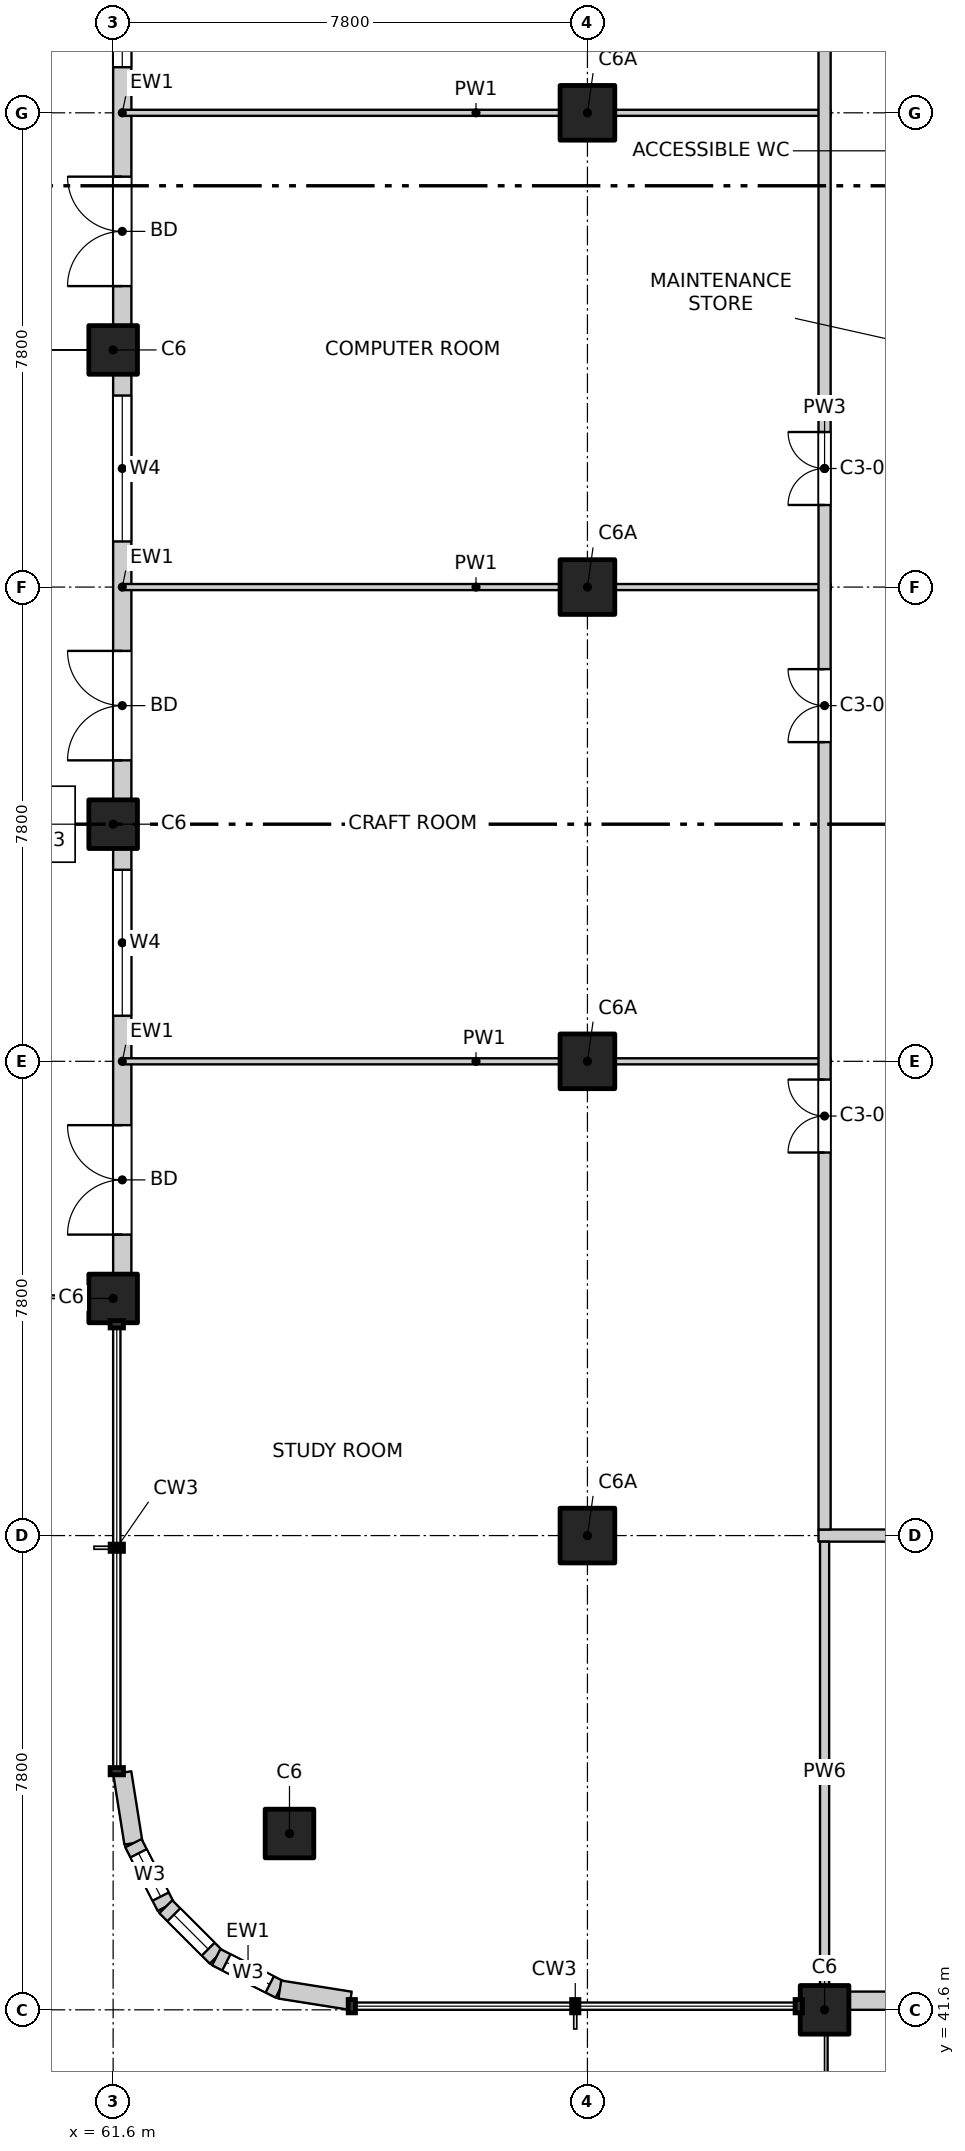
"""IFC4 building model, lengths in metres.
Left out: names, types, materials, properties, quantities, classifications, styles, units other than length and angle.
Written with IfcOpenShell. Run it as: python <this file> out.ifc"""

import sys

from ifc_helpers import new_model, si_unit, direction, frame, frame_2d, origin, origin_2d, place, context, subcontext, project, spatial, rectangle, extrude, element, fill, save


model = new_model("IFC4")
c1 = context("Model", 3, precision=1e-05, world=origin(), true_north=direction((0.0, 1.0)))
c2 = subcontext(c1, "Body", "Model", "MODEL_VIEW")
j1 = project(units=[si_unit("LENGTHUNIT", "METRE"), si_unit("PLANEANGLEUNIT", "RADIAN")], contexts=[c1])
p1 = place(None, origin())
s1 = spatial("IfcSite", under=j1, at=p1, CompositionType="ELEMENT")
p2 = place(p1, origin())
s2 = spatial("IfcBuilding", under=s1, at=p2, CompositionType="ELEMENT")
p3 = place(p2, frame((0.0, 0.0, 200.7)))
s3 = spatial("IfcBuildingStorey", under=s2, at=p3, CompositionType="ELEMENT", Elevation=200.7)
for number, where, z_axis, x_axis in (
    (1, (64.5, 44.5, -0.25), (0.0, 0.0, 1.0), (1.0, 0.0, 0.0)),
    (2, (61.6, 53.3, -0.25), (0.0, 0.0, 1.0), (1.0, 0.0, 0.0)),
    (3, (73.3, 41.6, -0.25), (0.0, 0.0, 1.0), (1.0, 0.0, 0.0)),
    (4, (61.6, 61.1, -0.25), (0.0, 0.0, 1.0), (1.0, 0.0, 0.0)),
    (5, (61.6, 68.9, -0.25), (0.0, 0.0, 1.0), (1.0, 0.0, 0.0)),
):
    element("IfcColumn", number, at=place(p3, frame(where, z_axis=z_axis, x_axis=x_axis)), inside=s3, PredefinedType="COLUMN", context=c2, shape_type="SweptSolid", body=[
        extrude(rectangle(XDim=0.8, YDim=0.8, at=origin_2d()), origin(), (0.0, 0.0, 1.0), 3.4),
    ])
for number, where, z_axis, x_axis in (
    (6, (69.4, 49.4, -0.25), (0.0, 0.0, 1.0), (1.0, 0.0, 0.0)),
    (7, (69.4, 57.2, -0.25), (0.0, 0.0, 1.0), (1.0, 0.0, 0.0)),
    (8, (69.4, 65.0, -0.25), (0.0, 0.0, 1.0), (1.0, 0.0, 0.0)),
    (9, (69.4, 72.8, -0.25), (0.0, 0.0, 1.0), (1.0, 0.0, 0.0)),
):
    element("IfcColumn", number, at=place(p3, frame(where, z_axis=z_axis, x_axis=x_axis)), inside=s3, PredefinedType="COLUMN", context=c2, shape_type="SweptSolid", body=[
        extrude(rectangle(XDim=0.9, YDim=0.9, at=origin_2d()), origin(), (0.0, 0.0, 1.0), 3.4),
    ])
p4 = place(p3, frame((73.7, 41.75, 0.0), z_axis=(0.0, 0.0, 1.0), x_axis=(1.0, 0.0, 0.0)))
e10 = element("IfcWall", 10, at=p4, inside=s3, PredefinedType="SOLIDWALL", context=c2, shape_type="SweptSolid", body=[
    extrude(rectangle(XDim=7.0, YDim=0.3, at=frame_2d((3.5, 0.0))), origin(), (0.0, 0.0, 1.0), 2.7),
])
p5 = place(p4, frame((0.65, 0.0, 0.0)))
e11 = element("IfcOpeningElement", 11, at=p5, cuts=e10, PredefinedType="OPENING", context=c2, shape_type="SweptSolid", body=[
    extrude(rectangle(XDim=1.8, YDim=2.4, at=frame_2d((0.9, 1.2))), frame((0.0, 0.16, 0.0), z_axis=(0.0, -1.0, 0.0), x_axis=(1.0, 0.0, 0.0)), (0.0, 0.0, 1.0), 0.32),
])
p6 = place(p4, frame((4.25, 0.0, 0.6)))
e12 = element("IfcOpeningElement", 12, at=p6, cuts=e10, PredefinedType="OPENING", context=c2, shape_type="SweptSolid", body=[
    extrude(rectangle(XDim=2.4, YDim=2.1, at=frame_2d((1.2, 1.05))), frame((0.0, 0.16, 0.0), z_axis=(0.0, -1.0, 0.0), x_axis=(1.0, 0.0, 0.0)), (0.0, 0.0, 1.0), 0.32),
])
p7 = place(p3, frame((61.75, 53.7, 0.0), z_axis=(0.0, 0.0, 1.0), x_axis=(0.0, 1.0, 0.0)))
e13 = element("IfcWall", 13, at=p7, inside=s3, PredefinedType="SOLIDWALL", context=c2, shape_type="SweptSolid", body=[
    extrude(rectangle(XDim=7.0, YDim=0.3, at=frame_2d((3.5, 0.0))), origin(), (0.0, 0.0, 1.0), 2.7),
])
p8 = place(p7, frame((0.65, 0.0, 0.0)))
e14 = element("IfcOpeningElement", 14, at=p8, cuts=e13, PredefinedType="OPENING", context=c2, shape_type="SweptSolid", body=[
    extrude(rectangle(XDim=1.8, YDim=2.4, at=frame_2d((0.9, 1.2))), frame((0.0, 0.16, 0.0), z_axis=(0.0, -1.0, 0.0), x_axis=(1.0, 0.0, 0.0)), (0.0, 0.0, 1.0), 0.32),
])
p9 = place(p7, frame((4.25, 0.0, 0.6)))
e15 = element("IfcOpeningElement", 15, at=p9, cuts=e13, PredefinedType="OPENING", context=c2, shape_type="SweptSolid", body=[
    extrude(rectangle(XDim=2.4, YDim=2.1, at=frame_2d((1.2, 1.05))), frame((0.0, 0.16, 0.0), z_axis=(0.0, -1.0, 0.0), x_axis=(1.0, 0.0, 0.0)), (0.0, 0.0, 1.0), 0.32),
])
p10 = place(p3, frame((61.75, 61.5, 0.0), z_axis=(0.0, 0.0, 1.0), x_axis=(0.0, 1.0, 0.0)))
e16 = element("IfcWall", 16, at=p10, inside=s3, PredefinedType="SOLIDWALL", context=c2, shape_type="SweptSolid", body=[
    extrude(rectangle(XDim=7.0, YDim=0.3, at=frame_2d((3.5, 0.0))), origin(), (0.0, 0.0, 1.0), 2.7),
])
p11 = place(p10, frame((0.65, 0.0, 0.0)))
e17 = element("IfcOpeningElement", 17, at=p11, cuts=e16, PredefinedType="OPENING", context=c2, shape_type="SweptSolid", body=[
    extrude(rectangle(XDim=1.8, YDim=2.4, at=frame_2d((0.9, 1.2))), frame((0.0, 0.16, 0.0), z_axis=(0.0, -1.0, 0.0), x_axis=(1.0, 0.0, 0.0)), (0.0, 0.0, 1.0), 0.32),
])
p12 = place(p10, frame((4.25, 0.0, 0.6)))
e18 = element("IfcOpeningElement", 18, at=p12, cuts=e16, PredefinedType="OPENING", context=c2, shape_type="SweptSolid", body=[
    extrude(rectangle(XDim=2.4, YDim=2.1, at=frame_2d((1.2, 1.05))), frame((0.0, 0.16, 0.0), z_axis=(0.0, -1.0, 0.0), x_axis=(1.0, 0.0, 0.0)), (0.0, 0.0, 1.0), 0.32),
])
p13 = place(p3, frame((61.75, 69.3, 0.0), z_axis=(0.0, 0.0, 1.0), x_axis=(0.0, 1.0, 0.0)))
e19 = element("IfcWall", 19, at=p13, inside=s3, PredefinedType="SOLIDWALL", context=c2, shape_type="SweptSolid", body=[
    extrude(rectangle(XDim=7.0, YDim=0.3, at=frame_2d((3.5, 0.0))), origin(), (0.0, 0.0, 1.0), 2.7),
])
p14 = place(p13, frame((0.65, 0.0, 0.0)))
e20 = element("IfcOpeningElement", 20, at=p14, cuts=e19, PredefinedType="OPENING", context=c2, shape_type="SweptSolid", body=[
    extrude(rectangle(XDim=1.8, YDim=2.4, at=frame_2d((0.9, 1.2))), frame((0.0, 0.16, 0.0), z_axis=(0.0, -1.0, 0.0), x_axis=(1.0, 0.0, 0.0)), (0.0, 0.0, 1.0), 0.32),
])
p15 = place(p13, frame((4.25, 0.0, 0.6)))
e21 = element("IfcOpeningElement", 21, at=p15, cuts=e19, PredefinedType="OPENING", context=c2, shape_type="SweptSolid", body=[
    extrude(rectangle(XDim=2.4, YDim=2.1, at=frame_2d((1.2, 1.05))), frame((0.0, 0.16, 0.0), z_axis=(0.0, -1.0, 0.0), x_axis=(1.0, 0.0, 0.0)), (0.0, 0.0, 1.0), 0.32),
])
p16 = place(p3, frame((61.75, 45.5, 0.0), z_axis=(0.0, 0.0, 1.0), x_axis=(0.156496880861, -0.987678452879, 0.0)))
e22 = element("IfcWall", 22, at=p16, inside=s3, PredefinedType="SOLIDWALL", context=c2, shape_type="SweptSolid", body=[
    extrude(rectangle(XDim=1.173, YDim=0.3, at=frame_2d((0.586, 0.0))), origin(), (0.0, 0.0, 1.0), 2.7),
])
p17 = place(p3, frame((61.934, 44.341, 0.0), z_axis=(0.0, 0.0, 1.0), x_axis=(0.454025524128, -0.890988677504, 0.0)))
e23 = element("IfcWall", 23, at=p17, inside=s3, PredefinedType="SOLIDWALL", context=c2, shape_type="SweptSolid", body=[
    extrude(rectangle(XDim=1.173, YDim=0.3, at=frame_2d((0.587, 0.0))), origin(), (0.0, 0.0, 1.0), 2.7),
])
p18 = place(p17, frame((0.187, 0.0, 0.9)))
e24 = element("IfcOpeningElement", 24, at=p18, cuts=e23, PredefinedType="OPENING", context=c2, shape_type="SweptSolid", body=[
    extrude(rectangle(XDim=0.8, YDim=1.2, at=frame_2d((0.4, 0.6))), frame((0.0, 0.16, 0.0), z_axis=(0.0, -1.0, 0.0), x_axis=(1.0, 0.0, 0.0)), (0.0, 0.0, 1.0), 0.32),
])
p19 = place(p3, frame((62.466, 43.296, 0.0), z_axis=(0.0, 0.0, 1.0), x_axis=(0.707106781187, -0.707106781187, 0.0)))
e25 = element("IfcWall", 25, at=p19, inside=s3, PredefinedType="SOLIDWALL", context=c2, shape_type="SweptSolid", body=[
    extrude(rectangle(XDim=1.173, YDim=0.3, at=frame_2d((0.586, 0.0))), origin(), (0.0, 0.0, 1.0), 2.7),
])
p20 = place(p19, frame((0.187, 0.0, 0.9)))
e26 = element("IfcOpeningElement", 26, at=p20, cuts=e25, PredefinedType="OPENING", context=c2, shape_type="SweptSolid", body=[
    extrude(rectangle(XDim=0.8, YDim=1.2, at=frame_2d((0.4, 0.6))), frame((0.0, 0.16, 0.0), z_axis=(0.0, -1.0, 0.0), x_axis=(1.0, 0.0, 0.0)), (0.0, 0.0, 1.0), 0.32),
])
p21 = place(p3, frame((63.296, 42.466, 0.0), z_axis=(0.0, 0.0, 1.0), x_axis=(0.890988677504, -0.454025524128, 0.0)))
e27 = element("IfcWall", 27, at=p21, inside=s3, PredefinedType="SOLIDWALL", context=c2, shape_type="SweptSolid", body=[
    extrude(rectangle(XDim=1.173, YDim=0.3, at=frame_2d((0.587, 0.0))), origin(), (0.0, 0.0, 1.0), 2.7),
])
p22 = place(p21, frame((0.187, 0.0, 0.9)))
e28 = element("IfcOpeningElement", 28, at=p22, cuts=e27, PredefinedType="OPENING", context=c2, shape_type="SweptSolid", body=[
    extrude(rectangle(XDim=0.8, YDim=1.2, at=frame_2d((0.4, 0.6))), frame((0.0, 0.16, 0.0), z_axis=(0.0, -1.0, 0.0), x_axis=(1.0, 0.0, 0.0)), (0.0, 0.0, 1.0), 0.32),
])
p23 = place(p3, frame((64.341, 41.934, 0.0), z_axis=(0.0, 0.0, 1.0), x_axis=(0.987678452879, -0.156496880861, 0.0)))
e29 = element("IfcWall", 29, at=p23, inside=s3, PredefinedType="SOLIDWALL", context=c2, shape_type="SweptSolid", body=[
    extrude(rectangle(XDim=1.173, YDim=0.3, at=frame_2d((0.586, 0.0))), origin(), (0.0, 0.0, 1.0), 2.7),
])
p24 = place(p3, frame((73.2, 49.4, 0.0), z_axis=(0.0, 0.0, 1.0), x_axis=(1.0, 0.0, 0.0)))
e30 = element("IfcWall", 30, at=p24, inside=s3, PredefinedType="PARTITIONING", context=c2, shape_type="SweptSolid", body=[
    extrude(rectangle(XDim=23.6, YDim=0.2, at=frame_2d((11.8, 0.0))), origin(), (0.0, 0.0, 1.0), 3.15),
])
p25 = place(p24, frame((2.25, 0.0, 0.0)))
e31 = element("IfcOpeningElement", 31, at=p25, cuts=e30, PredefinedType="OPENING", context=c2, shape_type="SweptSolid", body=[
    extrude(rectangle(XDim=1.2, YDim=2.1, at=frame_2d((0.6, 1.05))), frame((0.0, 0.11, 0.0), z_axis=(0.0, -1.0, 0.0), x_axis=(1.0, 0.0, 0.0)), (0.0, 0.0, 1.0), 0.22),
])
p26 = place(p24, frame((12.375, 0.0, 0.0)))
e32 = element("IfcOpeningElement", 32, at=p26, cuts=e30, PredefinedType="OPENING", context=c2, shape_type="SweptSolid", body=[
    extrude(rectangle(XDim=1.2, YDim=2.1, at=frame_2d((0.6, 1.05))), frame((0.0, 0.11, 0.0), z_axis=(0.0, -1.0, 0.0), x_axis=(1.0, 0.0, 0.0)), (0.0, 0.0, 1.0), 0.22),
])
p27 = place(p24, frame((20.15, 0.0, 0.0)))
e33 = element("IfcOpeningElement", 33, at=p27, cuts=e30, PredefinedType="OPENING", context=c2, shape_type="SweptSolid", body=[
    extrude(rectangle(XDim=1.2, YDim=2.1, at=frame_2d((0.6, 1.05))), frame((0.0, 0.11, 0.0), z_axis=(0.0, -1.0, 0.0), x_axis=(1.0, 0.0, 0.0)), (0.0, 0.0, 1.0), 0.22),
])
for number, where, z_axis, x_axis in (
    (34, (61.735, 57.2, 0.0), (0.0, 0.0, 1.0), (1.0, 0.0, 0.0)),
    (35, (61.735, 65.0, 0.0), (0.0, 0.0, 1.0), (1.0, 0.0, 0.0)),
    (36, (61.735, 72.8, 0.0), (0.0, 0.0, 1.0), (1.0, 0.0, 0.0)),
):
    element("IfcWall", number, at=place(p3, frame(where, z_axis=z_axis, x_axis=x_axis)), inside=s3, PredefinedType="PARTITIONING", context=c2, shape_type="SweptSolid", body=[
        extrude(rectangle(XDim=11.665, YDim=0.1, at=frame_2d((5.833, 0.0))), origin(), (0.0, 0.0, 1.0), 3.15),
    ])
p28 = place(p3, frame((73.3, 41.735, 0.0), z_axis=(0.0, 0.0, 1.0), x_axis=(0.0, 1.0, 0.0)))
e37 = element("IfcWall", 37, at=p28, inside=s3, PredefinedType="PARTITIONING", context=c2, shape_type="SweptSolid", body=[
    extrude(rectangle(XDim=7.565, YDim=0.15, at=frame_2d((3.782, 0.0))), origin(), (0.0, 0.0, 1.0), 3.15),
])
p29 = place(p3, frame((73.3, 49.5, 0.0), z_axis=(0.0, 0.0, 1.0), x_axis=(0.0, 1.0, 0.0)))
e38 = element("IfcWall", 38, at=p29, inside=s3, PredefinedType="PARTITIONING", context=c2, shape_type="SweptSolid", body=[
    extrude(rectangle(XDim=34.9, YDim=0.2, at=frame_2d((17.45, 0.0))), origin(), (0.0, 0.0, 1.0), 3.15),
])
p30 = place(p29, frame((6.2, 0.0, 0.0)))
e39 = element("IfcOpeningElement", 39, at=p30, cuts=e38, PredefinedType="OPENING", context=c2, shape_type="SweptSolid", body=[
    extrude(rectangle(XDim=1.2, YDim=2.1, at=frame_2d((0.6, 1.05))), frame((0.0, 0.11, 0.0), z_axis=(0.0, -1.0, 0.0), x_axis=(1.0, 0.0, 0.0)), (0.0, 0.0, 1.0), 0.22),
])
p31 = place(p29, frame((12.95, 0.0, 0.0)))
e40 = element("IfcOpeningElement", 40, at=p31, cuts=e38, PredefinedType="OPENING", context=c2, shape_type="SweptSolid", body=[
    extrude(rectangle(XDim=1.2, YDim=2.1, at=frame_2d((0.6, 1.05))), frame((0.0, 0.11, 0.0), z_axis=(0.0, -1.0, 0.0), x_axis=(1.0, 0.0, 0.0)), (0.0, 0.0, 1.0), 0.22),
])
p32 = place(p29, frame((16.85, 0.0, 0.0)))
e41 = element("IfcOpeningElement", 41, at=p32, cuts=e38, PredefinedType="OPENING", context=c2, shape_type="SweptSolid", body=[
    extrude(rectangle(XDim=1.2, YDim=2.1, at=frame_2d((0.6, 1.05))), frame((0.0, 0.11, 0.0), z_axis=(0.0, -1.0, 0.0), x_axis=(1.0, 0.0, 0.0)), (0.0, 0.0, 1.0), 0.22),
])
p33 = place(p29, frame((28.55, 0.0, 0.0)))
e42 = element("IfcOpeningElement", 42, at=p33, cuts=e38, PredefinedType="OPENING", context=c2, shape_type="SweptSolid", body=[
    extrude(rectangle(XDim=1.2, YDim=2.1, at=frame_2d((0.6, 1.05))), frame((0.0, 0.11, 0.0), z_axis=(0.0, -1.0, 0.0), x_axis=(1.0, 0.0, 0.0)), (0.0, 0.0, 1.0), 0.22),
])
p34 = place(p8, origin())
e43 = element("IfcDoor", 43, at=p34, inside=s3, OperationType="DOUBLE_DOOR_SINGLE_SWING", PredefinedType="DOOR", context=c2, shape_type="SweptSolid", body=[
    extrude(rectangle(XDim=1.8, YDim=2.4, at=frame_2d((0.9, 1.2))), frame((0.0, 0.025, 0.0), z_axis=(0.0, -1.0, 0.0), x_axis=(1.0, 0.0, 0.0)), (0.0, 0.0, 1.0), 0.05),
])
fill(e14, e43)
p35 = place(p9, origin())
e44 = element("IfcWindow", 44, at=p35, inside=s3, PartitioningType="SINGLE_PANEL", PredefinedType="WINDOW", context=c2, shape_type="SweptSolid", body=[
    extrude(rectangle(XDim=2.4, YDim=2.1, at=frame_2d((1.2, 1.05))), frame((0.0, 0.03, 0.0), z_axis=(0.0, -1.0, 0.0), x_axis=(1.0, 0.0, 0.0)), (0.0, 0.0, 1.0), 0.06),
])
fill(e15, e44)
p36 = place(p11, origin())
e45 = element("IfcDoor", 45, at=p36, inside=s3, OperationType="DOUBLE_DOOR_SINGLE_SWING", PredefinedType="DOOR", context=c2, shape_type="SweptSolid", body=[
    extrude(rectangle(XDim=1.8, YDim=2.4, at=frame_2d((0.9, 1.2))), frame((0.0, 0.025, 0.0), z_axis=(0.0, -1.0, 0.0), x_axis=(1.0, 0.0, 0.0)), (0.0, 0.0, 1.0), 0.05),
])
fill(e17, e45)
p37 = place(p12, origin())
e46 = element("IfcWindow", 46, at=p37, inside=s3, PartitioningType="SINGLE_PANEL", PredefinedType="WINDOW", context=c2, shape_type="SweptSolid", body=[
    extrude(rectangle(XDim=2.4, YDim=2.1, at=frame_2d((1.2, 1.05))), frame((0.0, 0.03, 0.0), z_axis=(0.0, -1.0, 0.0), x_axis=(1.0, 0.0, 0.0)), (0.0, 0.0, 1.0), 0.06),
])
fill(e18, e46)
p38 = place(p14, origin())
e47 = element("IfcDoor", 47, at=p38, inside=s3, OperationType="DOUBLE_DOOR_SINGLE_SWING", PredefinedType="DOOR", context=c2, shape_type="SweptSolid", body=[
    extrude(rectangle(XDim=1.8, YDim=2.4, at=frame_2d((0.9, 1.2))), frame((0.0, 0.025, 0.0), z_axis=(0.0, -1.0, 0.0), x_axis=(1.0, 0.0, 0.0)), (0.0, 0.0, 1.0), 0.05),
])
fill(e20, e47)
p39 = place(p15, origin())
e48 = element("IfcWindow", 48, at=p39, inside=s3, PartitioningType="SINGLE_PANEL", PredefinedType="WINDOW", context=c2, shape_type="SweptSolid", body=[
    extrude(rectangle(XDim=2.4, YDim=2.1, at=frame_2d((1.2, 1.05))), frame((0.0, 0.03, 0.0), z_axis=(0.0, -1.0, 0.0), x_axis=(1.0, 0.0, 0.0)), (0.0, 0.0, 1.0), 0.06),
])
fill(e21, e48)
p40 = place(p18, origin())
e49 = element("IfcWindow", 49, at=p40, inside=s3, PartitioningType="SINGLE_PANEL", PredefinedType="WINDOW", context=c2, shape_type="SweptSolid", body=[
    extrude(rectangle(XDim=0.8, YDim=1.2, at=frame_2d((0.4, 0.6))), frame((0.0, 0.03, 0.0), z_axis=(0.0, -1.0, 0.0), x_axis=(1.0, 0.0, 0.0)), (0.0, 0.0, 1.0), 0.06),
])
fill(e24, e49)
p41 = place(p20, origin())
e50 = element("IfcWindow", 50, at=p41, inside=s3, PartitioningType="SINGLE_PANEL", PredefinedType="WINDOW", context=c2, shape_type="SweptSolid", body=[
    extrude(rectangle(XDim=0.8, YDim=1.2, at=frame_2d((0.4, 0.6))), frame((0.0, 0.03, 0.0), z_axis=(0.0, -1.0, 0.0), x_axis=(1.0, 0.0, 0.0)), (0.0, 0.0, 1.0), 0.06),
])
fill(e26, e50)
p42 = place(p22, origin())
e51 = element("IfcWindow", 51, at=p42, inside=s3, PartitioningType="SINGLE_PANEL", PredefinedType="WINDOW", context=c2, shape_type="SweptSolid", body=[
    extrude(rectangle(XDim=0.8, YDim=1.2, at=frame_2d((0.4, 0.6))), frame((0.0, 0.03, 0.0), z_axis=(0.0, -1.0, 0.0), x_axis=(1.0, 0.0, 0.0)), (0.0, 0.0, 1.0), 0.06),
])
fill(e28, e51)
p43 = place(p30, origin())
e52 = element("IfcDoor", 52, at=p43, inside=s3, OperationType="DOUBLE_DOOR_SINGLE_SWING", PredefinedType="DOOR", context=c2, shape_type="SweptSolid", body=[
    extrude(rectangle(XDim=1.2, YDim=2.1, at=frame_2d((0.6, 1.05))), frame((0.0, 0.025, 0.0), z_axis=(0.0, -1.0, 0.0), x_axis=(1.0, 0.0, 0.0)), (0.0, 0.0, 1.0), 0.05),
])
fill(e39, e52)
p44 = place(p31, origin())
e53 = element("IfcDoor", 53, at=p44, inside=s3, OperationType="DOUBLE_DOOR_SINGLE_SWING", PredefinedType="DOOR", context=c2, shape_type="SweptSolid", body=[
    extrude(rectangle(XDim=1.2, YDim=2.1, at=frame_2d((0.6, 1.05))), frame((0.0, 0.025, 0.0), z_axis=(0.0, -1.0, 0.0), x_axis=(1.0, 0.0, 0.0)), (0.0, 0.0, 1.0), 0.05),
])
fill(e40, e53)
p45 = place(p32, origin())
e54 = element("IfcDoor", 54, at=p45, inside=s3, OperationType="DOUBLE_DOOR_SINGLE_SWING", PredefinedType="DOOR", context=c2, shape_type="SweptSolid", body=[
    extrude(rectangle(XDim=1.2, YDim=2.1, at=frame_2d((0.6, 1.05))), frame((0.0, 0.025, 0.0), z_axis=(0.0, -1.0, 0.0), x_axis=(1.0, 0.0, 0.0)), (0.0, 0.0, 1.0), 0.05),
])
fill(e41, e54)
save(model, sys.argv[1])
